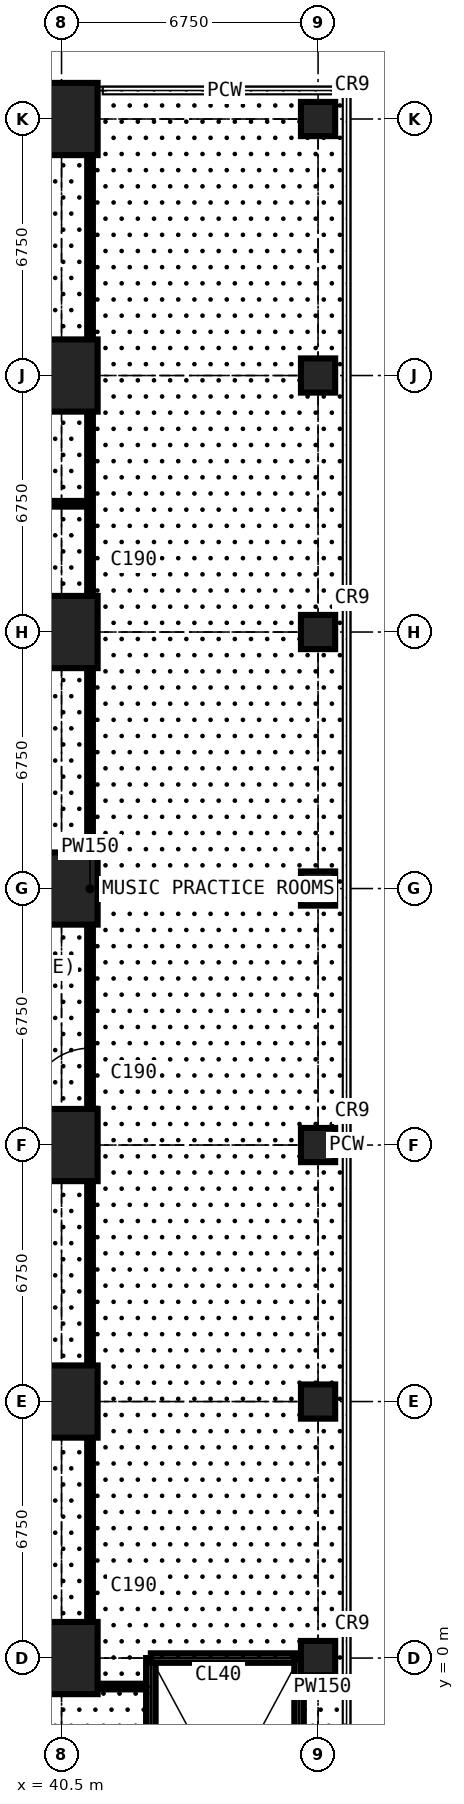
"""IFC4 building model, lengths in metres.
Left out: names, types, materials, properties, quantities, classifications, styles, units other than length and angle.
Written with IfcOpenShell. Run it as: python <this file> out.ifc"""

import sys

from ifc_helpers import new_model, si_unit, direction, frame, frame_2d, origin, origin_2d, place, context, subcontext, project, spatial, rectangle, circle, extrude, element, fill, save


model = new_model("IFC4")
c1 = context("Model", 3, precision=1e-05, world=origin(), true_north=direction((0.0, 1.0)))
c2 = subcontext(c1, "Body", "Model", "MODEL_VIEW")
j1 = project(units=[si_unit("LENGTHUNIT", "METRE"), si_unit("PLANEANGLEUNIT", "RADIAN")], contexts=[c1])
p1 = place(None, origin())
s1 = spatial("IfcSite", under=j1, at=p1, CompositionType="ELEMENT")
p2 = place(p1, origin())
s2 = spatial("IfcBuilding", under=s1, at=p2, CompositionType="ELEMENT")
p3 = place(p2, frame((0.0, 0.0, 4.5)))
s3 = spatial("IfcBuildingStorey", under=s2, at=p3, CompositionType="ELEMENT", Elevation=4.5)
for number, where, z_axis, x_axis in (
    (1, (40.5, 0.0, 0.0), (0.0, 0.0, 1.0), (1.0, 0.0, 0.0)),
    (2, (40.5, 6.75, 0.0), (0.0, 0.0, 1.0), (1.0, 0.0, 0.0)),
    (3, (40.5, 13.5, 0.0), (0.0, 0.0, 1.0), (1.0, 0.0, 0.0)),
    (4, (40.5, 20.25, 0.0), (0.0, 0.0, 1.0), (1.0, 0.0, 0.0)),
    (5, (40.5, 27.0, 0.0), (0.0, 0.0, 1.0), (1.0, 0.0, 0.0)),
    (6, (40.5, 33.75, 0.0), (0.0, 0.0, 1.0), (1.0, 0.0, 0.0)),
    (7, (40.5, 40.5, 0.0), (0.0, 0.0, 1.0), (1.0, 0.0, 0.0)),
):
    element("IfcColumn", number, at=place(p3, frame(where, z_axis=z_axis, x_axis=x_axis)), inside=s3, PredefinedType="COLUMN", context=c2, shape_type="SweptSolid", body=[
        extrude(rectangle(XDim=1.9, YDim=1.9, at=origin_2d()), origin(), (0.0, 0.0, 1.0), 4.5),
    ])
for number, where, z_axis, x_axis in (
    (8, (47.25, 0.0, 0.0), (0.0, 0.0, 1.0), (1.0, 0.0, 0.0)),
    (9, (47.25, 6.75, 0.0), (0.0, 0.0, 1.0), (1.0, 0.0, 0.0)),
    (10, (47.25, 13.5, 0.0), (0.0, 0.0, 1.0), (1.0, 0.0, 0.0)),
    (11, (47.25, 20.25, 0.0), (0.0, 0.0, 1.0), (1.0, 0.0, 0.0)),
    (12, (47.25, 27.0, 0.0), (0.0, 0.0, 1.0), (1.0, 0.0, 0.0)),
    (13, (47.25, 33.75, 0.0), (0.0, 0.0, 1.0), (1.0, 0.0, 0.0)),
    (14, (47.25, 40.5, 0.0), (0.0, 0.0, 1.0), (1.0, 0.0, 0.0)),
):
    element("IfcColumn", number, at=place(p3, frame(where, z_axis=z_axis, x_axis=x_axis)), inside=s3, PredefinedType="COLUMN", context=c2, shape_type="SweptSolid", body=[
        extrude(circle(Radius=0.45, at=origin_2d()), origin(), (0.0, 0.0, 1.0), 4.5),
    ])
p4 = place(p3, frame((-7.484, -0.75, 0.0), z_axis=(0.0, 0.0, 1.0), x_axis=(1.0, 0.0, 0.0)))
e15 = element("IfcWall", 15, at=p4, inside=s3, PredefinedType="PARTITIONING", context=c2, shape_type="SweptSolid", body=[
    extrude(rectangle(XDim=50.334, YDim=0.15, at=frame_2d((25.167, 0.0))), origin(), (0.0, 0.0, 1.0), 4.25),
])
p5 = place(p4, frame((18.384, 0.0, 0.0)))
e16 = element("IfcOpeningElement", 16, at=p5, cuts=e15, PredefinedType="OPENING", context=c2, shape_type="SweptSolid", body=[
    extrude(rectangle(XDim=1.6, YDim=2.4, at=frame_2d((0.8, 1.2))), frame((0.0, 0.085, 0.0), z_axis=(0.0, -1.0, 0.0), x_axis=(1.0, 0.0, 0.0)), (0.0, 0.0, 1.0), 0.17),
])
p6 = place(p4, frame((35.484, 0.0, 0.0)))
e17 = element("IfcOpeningElement", 17, at=p6, cuts=e15, PredefinedType="OPENING", context=c2, shape_type="SweptSolid", body=[
    extrude(rectangle(XDim=1.6, YDim=2.4, at=frame_2d((0.8, 1.2))), frame((0.0, 0.085, 0.0), z_axis=(0.0, -1.0, 0.0), x_axis=(1.0, 0.0, 0.0)), (0.0, 0.0, 1.0), 0.17),
])
p7 = place(p3, frame((30.375, 30.375, 0.0), z_axis=(0.0, 0.0, 1.0), x_axis=(1.0, 0.0, 0.0)))
e18 = element("IfcWall", 18, at=p7, inside=s3, PredefinedType="PARTITIONING", context=c2, shape_type="SweptSolid", body=[
    extrude(rectangle(XDim=10.875, YDim=0.15, at=frame_2d((5.438, 0.0))), origin(), (0.0, 0.0, 1.0), 4.25),
])
p8 = place(p3, frame((41.25, -0.75, 0.0), z_axis=(0.0, 0.0, 1.0), x_axis=(0.0, 1.0, 0.0)))
e19 = element("IfcWall", 19, at=p8, inside=s3, PredefinedType="PARTITIONING", context=c2, shape_type="SweptSolid", body=[
    extrude(rectangle(XDim=41.984, YDim=0.15, at=frame_2d((20.992, 0.0))), origin(), (0.0, 0.0, 1.0), 4.25),
])
p9 = place(p8, frame((15.2, 0.0, 0.0)))
e20 = element("IfcOpeningElement", 20, at=p9, cuts=e19, PredefinedType="OPENING", context=c2, shape_type="SweptSolid", body=[
    extrude(rectangle(XDim=1.6, YDim=2.4, at=frame_2d((0.8, 1.2))), frame((0.0, 0.085, 0.0), z_axis=(0.0, -1.0, 0.0), x_axis=(1.0, 0.0, 0.0)), (0.0, 0.0, 1.0), 0.17),
])
p10 = place(p3, frame((42.85, -7.25, 0.0), z_axis=(0.0, 0.0, 1.0), x_axis=(0.0, 1.0, 0.0)))
e21 = element("IfcWall", 21, at=p10, inside=s3, PredefinedType="SOLIDWALL", context=c2, shape_type="SweptSolid", body=[
    extrude(rectangle(XDim=7.25, YDim=0.25, at=frame_2d((3.625, 0.0))), origin(), (0.0, 0.0, 1.0), 4.25),
])
p11 = place(p3, frame((42.85, 0.0, 0.0), z_axis=(0.0, 0.0, 1.0), x_axis=(1.0, 0.0, 0.0)))
e22 = element("IfcWall", 22, at=p11, inside=s3, PredefinedType="SOLIDWALL", context=c2, shape_type="SweptSolid", body=[
    extrude(rectangle(XDim=3.9, YDim=0.25, at=frame_2d((1.95, 0.0))), origin(), (0.0, 0.0, 1.0), 4.25),
])
p12 = place(p3, frame((46.75, -7.25, 0.0), z_axis=(0.0, 0.0, 1.0), x_axis=(0.0, 1.0, 0.0)))
e23 = element("IfcWall", 23, at=p12, inside=s3, PredefinedType="SOLIDWALL", context=c2, shape_type="SweptSolid", body=[
    extrude(rectangle(XDim=7.25, YDim=0.25, at=frame_2d((3.625, 0.0))), origin(), (0.0, 0.0, 1.0), 4.25),
])
p13 = place(p3, frame((46.75, -0.75, 0.0), z_axis=(0.0, 0.0, 1.0), x_axis=(1.0, 0.0, 0.0)))
e24 = element("IfcWall", 24, at=p13, inside=s3, PredefinedType="PARTITIONING", context=c2, shape_type="SweptSolid", body=[
    extrude(rectangle(XDim=1.234, YDim=0.15, at=frame_2d((0.617, 0.0))), origin(), (0.0, 0.0, 1.0), 4.25),
])
p14 = place(p9, origin())
e25 = element("IfcDoor", 25, at=p14, inside=s3, OperationType="DOUBLE_DOOR_SINGLE_SWING", PredefinedType="DOOR", context=c2, shape_type="SweptSolid", body=[
    extrude(rectangle(XDim=1.6, YDim=2.4, at=frame_2d((0.8, 1.2))), frame((0.0, 0.025, 0.0), z_axis=(0.0, -1.0, 0.0), x_axis=(1.0, 0.0, 0.0)), (0.0, 0.0, 1.0), 0.05),
])
fill(e20, e25)
save(model, sys.argv[1])
